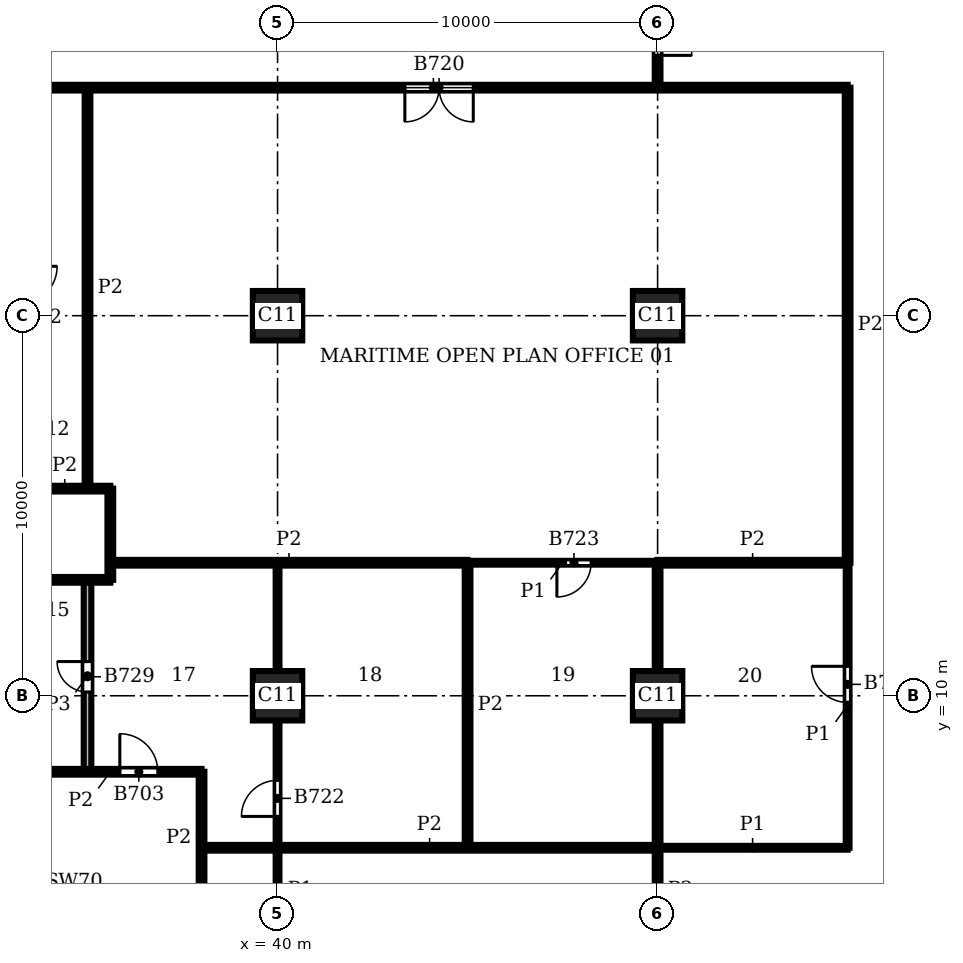
"""IFC4 building model, lengths in metres.
Left out: names, types, materials, properties, quantities, classifications, styles, units other than length and angle.
Written with IfcOpenShell. Run it as: python <this file> out.ifc"""

import sys

from ifc_helpers import new_model, si_unit, direction, frame, frame_2d, origin, origin_2d, place, context, subcontext, project, spatial, rectangle, extrude, element, fill, save


model = new_model("IFC4")
c1 = context("Model", 3, precision=1e-05, world=origin(), true_north=direction((0.0, 1.0)))
c2 = subcontext(c1, "Body", "Model", "MODEL_VIEW")
j1 = project(units=[si_unit("LENGTHUNIT", "METRE"), si_unit("PLANEANGLEUNIT", "RADIAN")], contexts=[c1])
p1 = place(None, origin())
s1 = spatial("IfcSite", under=j1, at=p1, CompositionType="ELEMENT")
p2 = place(p1, origin())
s2 = spatial("IfcBuilding", under=s1, at=p2, CompositionType="ELEMENT")
p3 = place(p2, frame((0.0, 0.0, 209.7)))
s3 = spatial("IfcBuildingStorey", under=s2, at=p3, CompositionType="ELEMENT", Elevation=209.7)
for number, where, z_axis, x_axis in (
    (1, (40.0, 10.0, 0.0), (0.0, 0.0, 1.0), (1.0, 0.0, 0.0)),
    (2, (40.0, 20.0, 0.0), (0.0, 0.0, 1.0), (1.0, 0.0, 0.0)),
    (3, (50.0, 10.0, 0.0), (0.0, 0.0, 1.0), (1.0, 0.0, 0.0)),
    (4, (50.0, 20.0, 0.0), (0.0, 0.0, 1.0), (1.0, 0.0, 0.0)),
):
    element("IfcColumn", number, at=place(p3, frame(where, z_axis=z_axis, x_axis=x_axis)), inside=s3, PredefinedType="COLUMN", context=c2, shape_type="SweptSolid", body=[
        extrude(rectangle(XDim=1.3, YDim=1.3, at=origin_2d()), origin(), (0.0, 0.0, 1.0), 3.9),
    ])
p4 = place(p3, frame((40.0, 0.45, 0.0), z_axis=(0.0, 0.0, 1.0), x_axis=(0.0, 1.0, 0.0)))
e5 = element("IfcWall", 5, at=p4, inside=s3, PredefinedType="PARTITIONING", context=c2, shape_type="SweptSolid", body=[
    extrude(rectangle(XDim=8.9, YDim=0.1, at=frame_2d((4.45, 0.0))), origin(), (0.0, 0.0, 1.0), 3.58),
])
p5 = place(p4, frame((6.375, 0.0, 0.0)))
e6 = element("IfcOpeningElement", 6, at=p5, cuts=e5, PredefinedType="OPENING", context=c2, shape_type="SweptSolid", body=[
    extrude(rectangle(XDim=0.95, YDim=2.1, at=frame_2d((0.475, 1.05))), frame((0.0, 0.06, 0.0), z_axis=(0.0, -1.0, 0.0), x_axis=(1.0, 0.0, 0.0)), (0.0, 0.0, 1.0), 0.12),
])
p6 = place(p4, frame((3.0, 0.0, 0.0)))
e7 = element("IfcOpeningElement", 7, at=p6, cuts=e5, PredefinedType="OPENING", context=c2, shape_type="SweptSolid", body=[
    extrude(rectangle(XDim=0.9, YDim=2.1, at=frame_2d((0.45, 1.05))), frame((0.0, 0.06, 0.0), z_axis=(0.0, -1.0, 0.0), x_axis=(1.0, 0.0, 0.0)), (0.0, 0.0, 1.0), 0.12),
])
p7 = place(p3, frame((40.0, 10.65, 0.0), z_axis=(0.0, 0.0, 1.0), x_axis=(0.0, 1.0, 0.0)))
e8 = element("IfcWall", 8, at=p7, inside=s3, PredefinedType="PARTITIONING", context=c2, shape_type="SweptSolid", body=[
    extrude(rectangle(XDim=2.85, YDim=0.1, at=frame_2d((1.425, 0.0))), origin(), (0.0, 0.0, 1.0), 3.58),
])
p8 = place(p3, frame((55.0, 6.0, 0.0), z_axis=(0.0, 0.0, 1.0), x_axis=(0.0, 1.0, 0.0)))
e9 = element("IfcWall", 9, at=p8, inside=s3, PredefinedType="PARTITIONING", context=c2, shape_type="SweptSolid", body=[
    extrude(rectangle(XDim=7.5, YDim=0.1, at=frame_2d((3.75, 0.0))), origin(), (0.0, 0.0, 1.0), 3.58),
])
p9 = place(p8, frame((3.825, 0.0, 0.0)))
e10 = element("IfcOpeningElement", 10, at=p9, cuts=e9, PredefinedType="OPENING", context=c2, shape_type="SweptSolid", body=[
    extrude(rectangle(XDim=0.95, YDim=2.1, at=frame_2d((0.475, 1.05))), frame((0.0, 0.06, 0.0), z_axis=(0.0, -1.0, 0.0), x_axis=(1.0, 0.0, 0.0)), (0.0, 0.0, 1.0), 0.12),
])
p10 = place(p3, frame((50.0, 6.0, 0.0), z_axis=(0.0, 0.0, 1.0), x_axis=(1.0, 0.0, 0.0)))
e11 = element("IfcWall", 11, at=p10, inside=s3, PredefinedType="PARTITIONING", context=c2, shape_type="SweptSolid", body=[
    extrude(rectangle(XDim=5.0, YDim=0.1, at=frame_2d((2.5, 0.0))), origin(), (0.0, 0.0, 1.0), 3.58),
])
p11 = place(p3, frame((45.0, 13.5, 0.0), z_axis=(0.0, 0.0, 1.0), x_axis=(1.0, 0.0, 0.0)))
e12 = element("IfcWall", 12, at=p11, inside=s3, PredefinedType="PARTITIONING", context=c2, shape_type="SweptSolid", body=[
    extrude(rectangle(XDim=5.0, YDim=0.1, at=frame_2d((2.5, 0.0))), origin(), (0.0, 0.0, 1.0), 3.58),
])
p12 = place(p11, frame((2.35, 0.0, 0.0)))
e13 = element("IfcOpeningElement", 13, at=p12, cuts=e12, PredefinedType="OPENING", context=c2, shape_type="SweptSolid", body=[
    extrude(rectangle(XDim=0.9, YDim=2.1, at=frame_2d((0.45, 1.05))), frame((0.0, 0.06, 0.0), z_axis=(0.0, -1.0, 0.0), x_axis=(1.0, 0.0, 0.0)), (0.0, 0.0, 1.0), 0.12),
])
p13 = place(p3, frame((35.0, 15.45, 0.0), z_axis=(0.0, 0.0, 1.0), x_axis=(0.0, 1.0, 0.0)))
e14 = element("IfcWall", 14, at=p13, inside=s3, PredefinedType="PARTITIONING", context=c2, shape_type="SweptSolid", body=[
    extrude(rectangle(XDim=10.55, YDim=0.15, at=frame_2d((5.275, 0.0))), origin(), (0.0, 0.0, 1.0), 3.58),
])
p14 = place(p3, frame((35.6, 13.05, 0.0), z_axis=(0.0, 0.0, 1.0), x_axis=(0.0, 1.0, 0.0)))
e15 = element("IfcWall", 15, at=p14, inside=s3, PredefinedType="PARTITIONING", context=c2, shape_type="SweptSolid", body=[
    extrude(rectangle(XDim=2.4, YDim=0.15, at=frame_2d((1.2, 0.0))), origin(), (0.0, 0.0, 1.0), 3.58),
])
p15 = place(p3, frame((38.0, 4.5, 0.0), z_axis=(0.0, 0.0, 1.0), x_axis=(0.0, 1.0, 0.0)))
e16 = element("IfcWall", 16, at=p15, inside=s3, PredefinedType="PARTITIONING", context=c2, shape_type="SweptSolid", body=[
    extrude(rectangle(XDim=3.5, YDim=0.15, at=frame_2d((1.75, 0.0))), origin(), (0.0, 0.0, 1.0), 3.58),
])
p16 = place(p3, frame((45.0, 6.0, 0.0), z_axis=(0.0, 0.0, 1.0), x_axis=(0.0, 1.0, 0.0)))
e17 = element("IfcWall", 17, at=p16, inside=s3, PredefinedType="PARTITIONING", context=c2, shape_type="SweptSolid", body=[
    extrude(rectangle(XDim=7.5, YDim=0.15, at=frame_2d((3.75, 0.0))), origin(), (0.0, 0.0, 1.0), 3.58),
])
p17 = place(p3, frame((50.0, 0.45, 0.0), z_axis=(0.0, 0.0, 1.0), x_axis=(0.0, 1.0, 0.0)))
e18 = element("IfcWall", 18, at=p17, inside=s3, PredefinedType="PARTITIONING", context=c2, shape_type="SweptSolid", body=[
    extrude(rectangle(XDim=8.9, YDim=0.15, at=frame_2d((4.45, 0.0))), origin(), (0.0, 0.0, 1.0), 3.58),
])
p18 = place(p3, frame((50.0, 10.65, 0.0), z_axis=(0.0, 0.0, 1.0), x_axis=(0.0, 1.0, 0.0)))
e19 = element("IfcWall", 19, at=p18, inside=s3, PredefinedType="PARTITIONING", context=c2, shape_type="SweptSolid", body=[
    extrude(rectangle(XDim=2.85, YDim=0.15, at=frame_2d((1.425, 0.0))), origin(), (0.0, 0.0, 1.0), 3.58),
])
p19 = place(p3, frame((50.0, 26.0, 0.0), z_axis=(0.0, 0.0, 1.0), x_axis=(0.0, 1.0, 0.0)))
e20 = element("IfcWall", 20, at=p19, inside=s3, PredefinedType="PARTITIONING", context=c2, shape_type="SweptSolid", body=[
    extrude(rectangle(XDim=3.55, YDim=0.15, at=frame_2d((1.775, 0.0))), origin(), (0.0, 0.0, 1.0), 3.58),
])
p20 = place(p19, frame((0.85, 0.0, 0.0)))
e21 = element("IfcOpeningElement", 21, at=p20, cuts=e20, PredefinedType="OPENING", context=c2, shape_type="SweptSolid", body=[
    extrude(rectangle(XDim=1.8, YDim=2.1, at=frame_2d((0.9, 1.05))), frame((0.0, 0.085, 0.0), z_axis=(0.0, -1.0, 0.0), x_axis=(1.0, 0.0, 0.0)), (0.0, 0.0, 1.0), 0.17),
])
p21 = place(p3, frame((55.0, 13.5, 0.0), z_axis=(0.0, 0.0, 1.0), x_axis=(0.0, 1.0, 0.0)))
e22 = element("IfcWall", 22, at=p21, inside=s3, PredefinedType="PARTITIONING", context=c2, shape_type="SweptSolid", body=[
    extrude(rectangle(XDim=12.5, YDim=0.15, at=frame_2d((6.25, 0.0))), origin(), (0.0, 0.0, 1.0), 3.58),
])
p22 = place(p3, frame((38.0, 6.0, 0.0), z_axis=(0.0, 0.0, 1.0), x_axis=(1.0, 0.0, 0.0)))
e23 = element("IfcWall", 23, at=p22, inside=s3, PredefinedType="PARTITIONING", context=c2, shape_type="SweptSolid", body=[
    extrude(rectangle(XDim=12.0, YDim=0.15, at=frame_2d((6.0, 0.0))), origin(), (0.0, 0.0, 1.0), 3.58),
])
p23 = place(p3, frame((33.2, 8.0, 0.0), z_axis=(0.0, 0.0, 1.0), x_axis=(1.0, 0.0, 0.0)))
e24 = element("IfcWall", 24, at=p23, inside=s3, PredefinedType="PARTITIONING", context=c2, shape_type="SweptSolid", body=[
    extrude(rectangle(XDim=4.8, YDim=0.15, at=frame_2d((2.4, 0.0))), origin(), (0.0, 0.0, 1.0), 3.58),
])
p24 = place(p23, frame((2.65, 0.0, 0.0)))
e25 = element("IfcOpeningElement", 25, at=p24, cuts=e24, PredefinedType="OPENING", context=c2, shape_type="SweptSolid", body=[
    extrude(rectangle(XDim=1.0, YDim=2.1, at=frame_2d((0.5, 1.05))), frame((0.0, 0.085, 0.0), z_axis=(0.0, -1.0, 0.0), x_axis=(1.0, 0.0, 0.0)), (0.0, 0.0, 1.0), 0.17),
])
p25 = place(p3, frame((33.2, 13.05, 0.0), z_axis=(0.0, 0.0, 1.0), x_axis=(1.0, 0.0, 0.0)))
e26 = element("IfcWall", 26, at=p25, inside=s3, PredefinedType="PARTITIONING", context=c2, shape_type="SweptSolid", body=[
    extrude(rectangle(XDim=2.4, YDim=0.15, at=frame_2d((1.2, 0.0))), origin(), (0.0, 0.0, 1.0), 3.58),
])
p26 = place(p3, frame((35.6, 13.5, 0.0), z_axis=(0.0, 0.0, 1.0), x_axis=(1.0, 0.0, 0.0)))
e27 = element("IfcWall", 27, at=p26, inside=s3, PredefinedType="PARTITIONING", context=c2, shape_type="SweptSolid", body=[
    extrude(rectangle(XDim=9.4, YDim=0.15, at=frame_2d((4.7, 0.0))), origin(), (0.0, 0.0, 1.0), 3.58),
])
p27 = place(p3, frame((50.0, 13.5, 0.0), z_axis=(0.0, 0.0, 1.0), x_axis=(1.0, 0.0, 0.0)))
e28 = element("IfcWall", 28, at=p27, inside=s3, PredefinedType="PARTITIONING", context=c2, shape_type="SweptSolid", body=[
    extrude(rectangle(XDim=5.0, YDim=0.15, at=frame_2d((2.5, 0.0))), origin(), (0.0, 0.0, 1.0), 3.58),
])
p28 = place(p3, frame((33.2, 15.45, 0.0), z_axis=(0.0, 0.0, 1.0), x_axis=(1.0, 0.0, 0.0)))
e29 = element("IfcWall", 29, at=p28, inside=s3, PredefinedType="PARTITIONING", context=c2, shape_type="SweptSolid", body=[
    extrude(rectangle(XDim=2.4, YDim=0.15, at=frame_2d((1.2, 0.0))), origin(), (0.0, 0.0, 1.0), 3.58),
])
p29 = place(p3, frame((33.2, 26.0, 0.0), z_axis=(0.0, 0.0, 1.0), x_axis=(1.0, 0.0, 0.0)))
e30 = element("IfcWall", 30, at=p29, inside=s3, PredefinedType="PARTITIONING", context=c2, shape_type="SweptSolid", body=[
    extrude(rectangle(XDim=21.8, YDim=0.15, at=frame_2d((10.9, 0.0))), origin(), (0.0, 0.0, 1.0), 3.58),
])
p30 = place(p29, frame((10.15, 0.0, 0.0)))
e31 = element("IfcOpeningElement", 31, at=p30, cuts=e30, PredefinedType="OPENING", context=c2, shape_type="SweptSolid", body=[
    extrude(rectangle(XDim=1.8, YDim=2.1, at=frame_2d((0.9, 1.05))), frame((0.0, 0.085, 0.0), z_axis=(0.0, -1.0, 0.0), x_axis=(1.0, 0.0, 0.0)), (0.0, 0.0, 1.0), 0.17),
])
p31 = place(p3, frame((35.0, 8.0, 0.0), z_axis=(0.0, 0.0, 1.0), x_axis=(0.0, 1.0, 0.0)))
e32 = element("IfcWall", 32, at=p31, inside=s3, PredefinedType="PARTITIONING", context=c2, shape_type="SweptSolid", body=[
    extrude(rectangle(XDim=5.05, YDim=0.2, at=frame_2d((2.525, 0.0))), origin(), (0.0, 0.0, 1.0), 3.58),
])
p32 = place(p31, frame((2.1, 0.0, 0.0)))
e33 = element("IfcOpeningElement", 33, at=p32, cuts=e32, PredefinedType="OPENING", context=c2, shape_type="SweptSolid", body=[
    extrude(rectangle(XDim=0.8, YDim=2.1, at=frame_2d((0.4, 1.05))), frame((0.0, 0.11, 0.0), z_axis=(0.0, -1.0, 0.0), x_axis=(1.0, 0.0, 0.0)), (0.0, 0.0, 1.0), 0.22),
])
p33 = place(p24, origin())
e34 = element("IfcDoor", 34, at=p33, inside=s3, OperationType="SINGLE_SWING_LEFT", PredefinedType="DOOR", context=c2, shape_type="SweptSolid", body=[
    extrude(rectangle(XDim=1.0, YDim=2.1, at=frame_2d((0.5, 1.05))), frame((0.0, 0.025, 0.0), z_axis=(0.0, -1.0, 0.0), x_axis=(1.0, 0.0, 0.0)), (0.0, 0.0, 1.0), 0.05),
])
fill(e25, e34)
p34 = place(p20, frame((1.8, 0.0, 0.0), z_axis=(0.0, 0.0, 1.0), x_axis=(-1.0, 0.0, 0.0)))
e35 = element("IfcDoor", 35, at=p34, inside=s3, OperationType="DOUBLE_DOOR_SINGLE_SWING", PredefinedType="DOOR", context=c2, shape_type="SweptSolid", body=[
    extrude(rectangle(XDim=1.8, YDim=2.1, at=frame_2d((0.9, 1.05))), frame((0.0, 0.025, 0.0), z_axis=(0.0, -1.0, 0.0), x_axis=(1.0, 0.0, 0.0)), (0.0, 0.0, 1.0), 0.05),
])
fill(e21, e35)
p35 = place(p30, frame((1.8, 0.0, 0.0), z_axis=(0.0, 0.0, 1.0), x_axis=(-1.0, 0.0, 0.0)))
e36 = element("IfcDoor", 36, at=p35, inside=s3, OperationType="DOUBLE_DOOR_SINGLE_SWING", PredefinedType="DOOR", context=c2, shape_type="SweptSolid", body=[
    extrude(rectangle(XDim=1.8, YDim=2.1, at=frame_2d((0.9, 1.05))), frame((0.0, 0.025, 0.0), z_axis=(0.0, -1.0, 0.0), x_axis=(1.0, 0.0, 0.0)), (0.0, 0.0, 1.0), 0.05),
])
fill(e31, e36)
p36 = place(p5, origin())
e37 = element("IfcDoor", 37, at=p36, inside=s3, OperationType="SINGLE_SWING_LEFT", PredefinedType="DOOR", context=c2, shape_type="SweptSolid", body=[
    extrude(rectangle(XDim=0.95, YDim=2.1, at=frame_2d((0.475, 1.05))), frame((0.0, 0.025, 0.0), z_axis=(0.0, -1.0, 0.0), x_axis=(1.0, 0.0, 0.0)), (0.0, 0.0, 1.0), 0.05),
])
fill(e6, e37)
p37 = place(p12, frame((0.9, 0.0, 0.0), z_axis=(0.0, 0.0, 1.0), x_axis=(-1.0, 0.0, 0.0)))
e38 = element("IfcDoor", 38, at=p37, inside=s3, OperationType="SINGLE_SWING_RIGHT", PredefinedType="DOOR", context=c2, shape_type="SweptSolid", body=[
    extrude(rectangle(XDim=0.9, YDim=2.1, at=frame_2d((0.45, 1.05))), frame((0.0, 0.025, 0.0), z_axis=(0.0, -1.0, 0.0), x_axis=(1.0, 0.0, 0.0)), (0.0, 0.0, 1.0), 0.05),
])
fill(e13, e38)
p38 = place(p9, origin())
e39 = element("IfcDoor", 39, at=p38, inside=s3, OperationType="SINGLE_SWING_RIGHT", PredefinedType="DOOR", context=c2, shape_type="SweptSolid", body=[
    extrude(rectangle(XDim=0.95, YDim=2.1, at=frame_2d((0.475, 1.05))), frame((0.0, 0.025, 0.0), z_axis=(0.0, -1.0, 0.0), x_axis=(1.0, 0.0, 0.0)), (0.0, 0.0, 1.0), 0.05),
])
fill(e10, e39)
p39 = place(p32, origin())
e40 = element("IfcDoor", 40, at=p39, inside=s3, OperationType="SINGLE_SWING_RIGHT", PredefinedType="DOOR", context=c2, shape_type="SweptSolid", body=[
    extrude(rectangle(XDim=0.8, YDim=2.1, at=frame_2d((0.4, 1.05))), frame((0.0, 0.025, 0.0), z_axis=(0.0, -1.0, 0.0), x_axis=(1.0, 0.0, 0.0)), (0.0, 0.0, 1.0), 0.05),
])
fill(e33, e40)
save(model, sys.argv[1])
